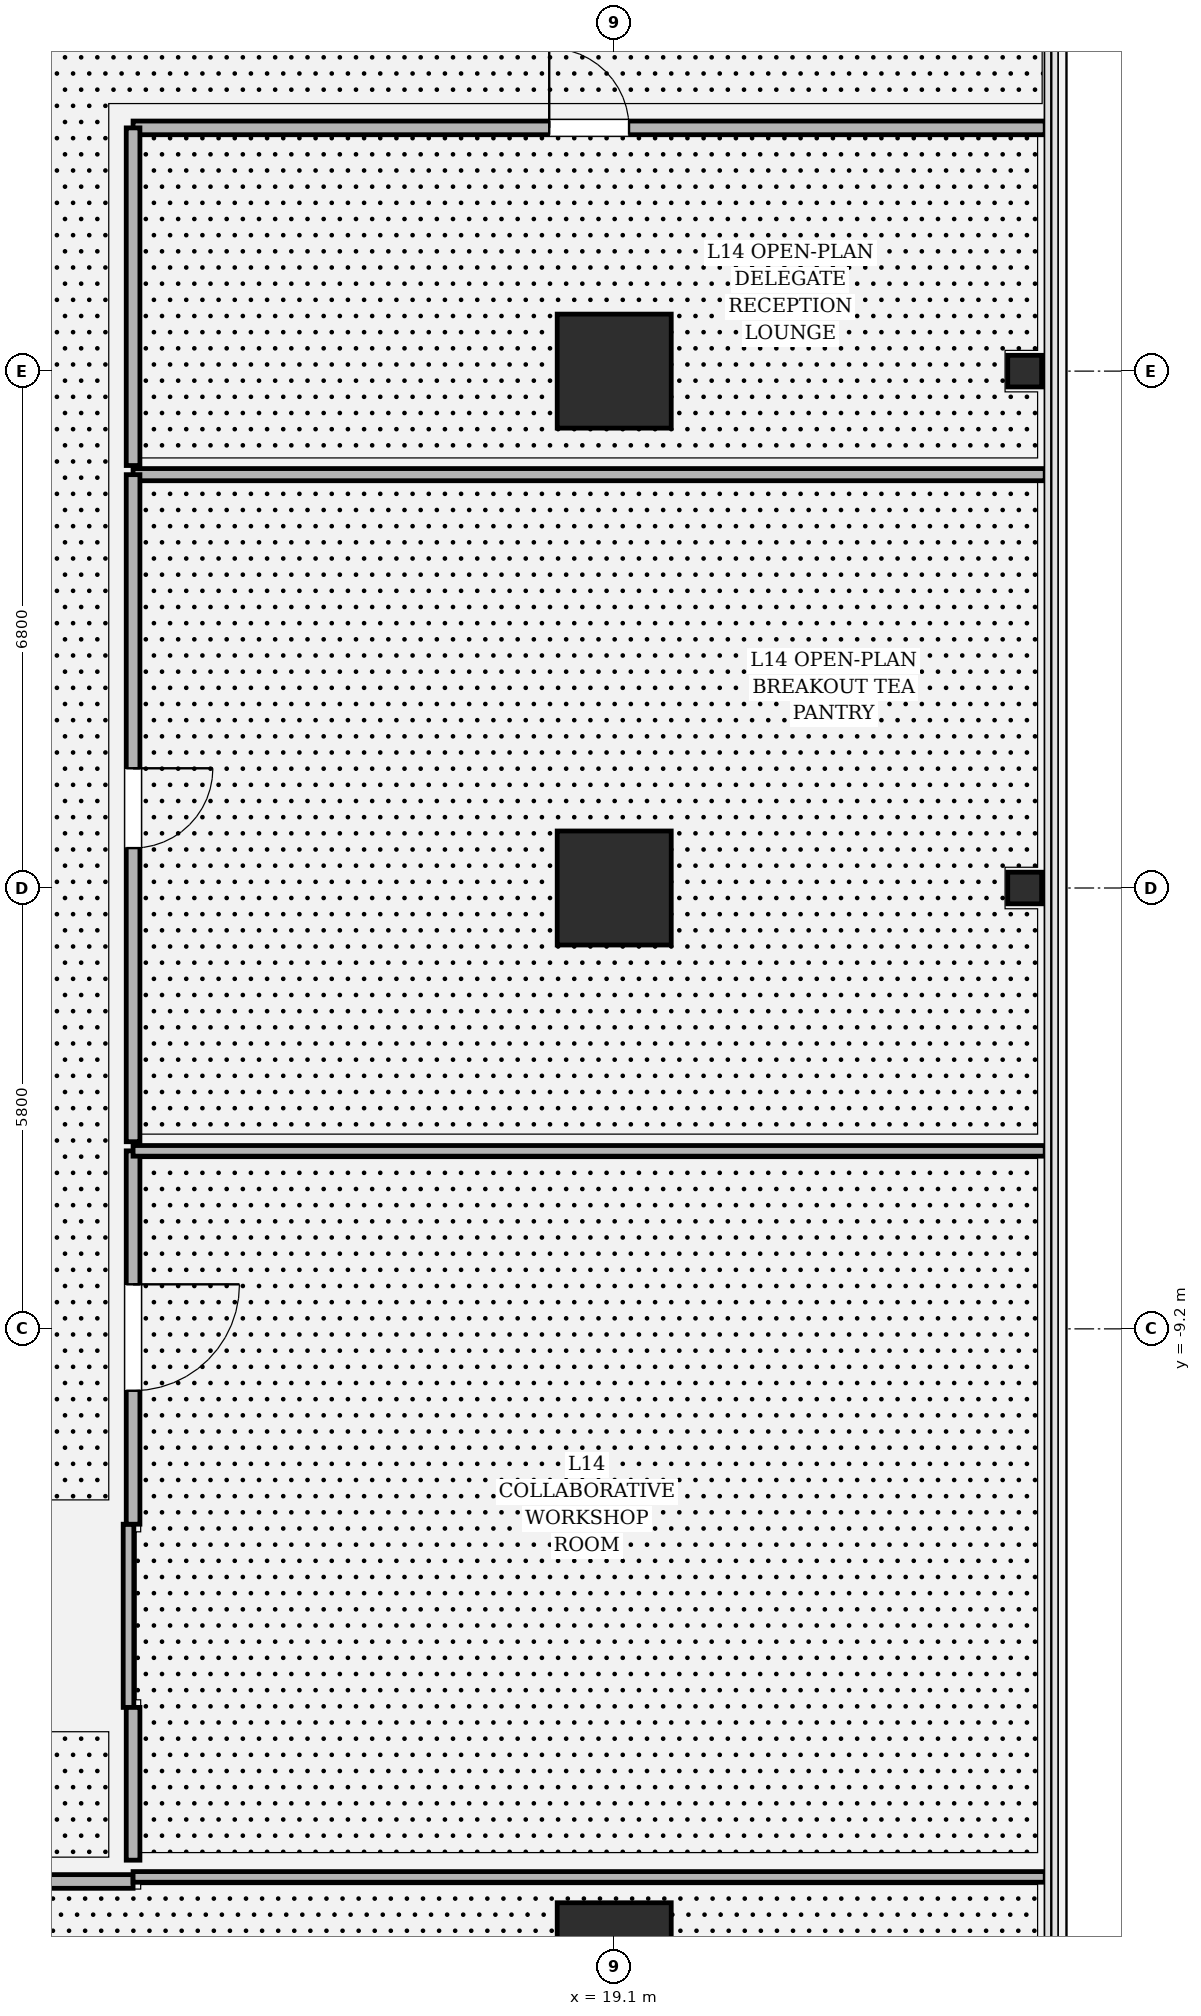
"""IFC4 building model, lengths in metres.
Left out: names, types, materials, properties, quantities, classifications, styles, units other than length and angle.
Written with IfcOpenShell. Run it as: python <this file> out.ifc"""

import sys

from ifc_helpers import new_model, si_unit, direction, frame, frame_2d, origin, origin_2d, place, context, subcontext, project, spatial, rectangle, hollow_rectangle, i_section, extrude, element, fill, save


model = new_model("IFC4")
c1 = context("Model", 3, precision=1e-05, world=origin(), true_north=direction((0.0, 1.0)))
c2 = subcontext(c1, "Body", "Model", "MODEL_VIEW")
j1 = project(units=[si_unit("LENGTHUNIT", "METRE"), si_unit("PLANEANGLEUNIT", "RADIAN")], contexts=[c1])
p1 = place(None, origin())
s1 = spatial("IfcSite", under=j1, at=p1, CompositionType="ELEMENT")
p2 = place(p1, origin())
s2 = spatial("IfcBuilding", under=s1, at=p2, CompositionType="ELEMENT")
p3 = place(p2, frame((0.0, 0.0, 64.65)))
s3 = spatial("IfcBuildingStorey", under=s2, at=p3, CompositionType="ELEMENT", Elevation=64.65)
for number, where, z_axis, x_axis in (
    (1, (19.1, -17.5, 0.0), (0.0, 0.0, 1.0), (1.0, 0.0, 0.0)),
    (2, (19.1, -3.4, 0.0), (0.0, 0.0, 1.0), (1.0, 0.0, 0.0)),
    (3, (19.1, 3.4, 0.0), (0.0, 0.0, 1.0), (1.0, 0.0, 0.0)),
):
    element("IfcColumn", number, at=place(p3, frame(where, z_axis=z_axis, x_axis=x_axis)), inside=s3, PredefinedType="COLUMN", context=c2, shape_type="SweptSolid", body=[
        extrude(hollow_rectangle(XDim=1.5, YDim=1.5, WallThickness=0.045, at=origin_2d()), origin(), (0.0, 0.0, 1.0), 4.05),
    ])
for number, where, z_axis, x_axis in (
    (4, (24.5, -3.4, 0.0), (0.0, 0.0, 1.0), (0.0, 1.0, 0.0)),
    (5, (24.5, 3.4, 0.0), (0.0, 0.0, 1.0), (0.0, 1.0, 0.0)),
):
    element("IfcColumn", number, at=place(p3, frame(where, z_axis=z_axis, x_axis=x_axis)), inside=s3, PredefinedType="COLUMN", context=c2, shape_type="SweptSolid", body=[
        extrude(i_section(OverallWidth=0.416, OverallDepth=0.446, WebThickness=0.039, FlangeThickness=0.062, FilletRadius=0.018, at=origin_2d()), origin(), (0.0, 0.0, 1.0), 4.048),
    ])
p4 = place(p3, frame((-4.022, -16.47, 0.0), z_axis=(0.0, 0.0, 1.0), x_axis=(1.0, 0.0, 0.0)))
e6 = element("IfcWall", 6, at=p4, inside=s3, PredefinedType="PARTITIONING", context=c2, shape_type="SweptSolid", body=[
    extrude(rectangle(XDim=16.792, YDim=0.18, at=frame_2d((8.396, 0.0))), origin(), (0.0, 0.0, 1.0), 3.104),
])
p5 = place(p4, frame((9.046, 0.0, 0.0)))
e7 = element("IfcOpeningElement", 7, at=p5, cuts=e6, PredefinedType="OPENING", context=c2, shape_type="SweptSolid", body=[
    extrude(rectangle(XDim=1.4, YDim=2.25, at=frame_2d((0.7, 1.125))), frame((0.0, 0.1, 0.0), z_axis=(0.0, -1.0, 0.0), x_axis=(1.0, 0.0, 0.0)), (0.0, 0.0, 1.0), 0.2),
])
p6 = place(p3, frame((12.77, -16.41, 0.0), z_axis=(0.0, 0.0, 1.0), x_axis=(1.0, 0.0, 0.0)))
e8 = element("IfcWall", 8, at=p6, inside=s3, PredefinedType="PARTITIONING", context=c2, shape_type="SweptSolid", body=[
    extrude(rectangle(XDim=12.0, YDim=0.14, at=frame_2d((6.0, 0.0))), origin(), (0.0, 0.0, 1.0), 2.524),
])
p7 = place(p3, frame((12.71, -14.18, 0.0), z_axis=(0.0, 0.0, 1.0), x_axis=(0.0, 1.0, 0.0)))
e9 = element("IfcWall", 9, at=p7, inside=s3, PredefinedType="PARTITIONING", context=c2, shape_type="SweptSolid", body=[
    extrude(rectangle(XDim=2.41, YDim=0.14, at=frame_2d((1.205, 0.0))), origin(), (0.0, 0.0, 1.0), 3.354),
])
p8 = place(p3, frame((12.77, -11.77, 0.0), z_axis=(0.0, 0.0, 1.0), x_axis=(0.0, 1.0, 0.0)))
e10 = element("IfcWall", 10, at=p8, inside=s3, PredefinedType="PARTITIONING", context=c2, shape_type="SweptSolid", body=[
    extrude(rectangle(XDim=4.912, YDim=0.18, at=frame_2d((2.456, 0.0))), origin(), (0.0, 0.0, 1.0), 3.104),
])
p9 = place(p8, frame((1.756, 0.0, 0.0)))
e11 = element("IfcOpeningElement", 11, at=p9, cuts=e10, PredefinedType="OPENING", context=c2, shape_type="SweptSolid", body=[
    extrude(rectangle(XDim=1.4, YDim=2.25, at=frame_2d((0.7, 1.125))), frame((0.0, 0.1, 0.0), z_axis=(0.0, -1.0, 0.0), x_axis=(1.0, 0.0, 0.0)), (0.0, 0.0, 1.0), 0.2),
])
p10 = place(p3, frame((12.77, -6.858, 0.0), z_axis=(0.0, 0.0, 1.0), x_axis=(1.0, 0.0, 0.0)))
e12 = element("IfcWall", 12, at=p10, inside=s3, PredefinedType="PARTITIONING", context=c2, shape_type="SweptSolid", body=[
    extrude(rectangle(XDim=12.0, YDim=0.14, at=frame_2d((6.0, 0.0))), origin(), (0.0, 0.0, 1.0), 2.524),
])
p11 = place(p3, frame((12.77, -16.19, 0.0), z_axis=(0.0, 0.0, 1.0), x_axis=(0.0, 1.0, 0.0)))
e13 = element("IfcWall", 13, at=p11, inside=s3, PredefinedType="PARTITIONING", context=c2, shape_type="SweptSolid", body=[
    extrude(rectangle(XDim=2.01, YDim=0.18, at=frame_2d((1.005, 0.0))), origin(), (0.0, 0.0, 1.0), 3.81),
])
p12 = place(p3, frame((12.77, 2.038, 0.0), z_axis=(0.0, 0.0, 1.0), x_axis=(1.0, 0.0, 0.0)))
e14 = element("IfcWall", 14, at=p12, inside=s3, PredefinedType="PARTITIONING", context=c2, shape_type="SweptSolid", body=[
    extrude(rectangle(XDim=12.0, YDim=0.16, at=frame_2d((6.0, 0.0))), origin(), (0.0, 0.0, 1.0), 2.524),
])
p13 = place(p3, frame((12.77, -6.738, 0.0), z_axis=(0.0, 0.0, 1.0), x_axis=(0.0, 1.0, 0.0)))
e15 = element("IfcWall", 15, at=p13, inside=s3, PredefinedType="PARTITIONING", context=c2, shape_type="SweptSolid", body=[
    extrude(rectangle(XDim=8.776, YDim=0.18, at=frame_2d((4.388, 0.0))), origin(), (0.0, 0.0, 1.0), 3.104),
])
p14 = place(p13, frame((3.863, 0.0, 0.0)))
e16 = element("IfcOpeningElement", 16, at=p14, cuts=e15, PredefinedType="OPENING", context=c2, shape_type="SweptSolid", body=[
    extrude(rectangle(XDim=1.05, YDim=2.2, at=frame_2d((0.525, 1.1))), frame((0.0, 0.1, 0.0), z_axis=(0.0, -1.0, 0.0), x_axis=(1.0, 0.0, 0.0)), (0.0, 0.0, 1.0), 0.2),
])
p15 = place(p3, frame((12.77, 6.6, 0.0), z_axis=(0.0, 0.0, 1.0), x_axis=(1.0, 0.0, 0.0)))
e17 = element("IfcWall", 17, at=p15, inside=s3, PredefinedType="PARTITIONING", context=c2, shape_type="SweptSolid", body=[
    extrude(rectangle(XDim=12.0, YDim=0.18, at=frame_2d((6.0, 0.0))), origin(), (0.0, 0.0, 1.0), 2.524),
])
p16 = place(p15, frame((5.475, 0.0, 0.0)))
e18 = element("IfcOpeningElement", 18, at=p16, cuts=e17, PredefinedType="OPENING", context=c2, shape_type="SweptSolid", body=[
    extrude(rectangle(XDim=1.05, YDim=2.2, at=frame_2d((0.525, 1.1))), frame((0.0, 0.1, 0.0), z_axis=(0.0, -1.0, 0.0), x_axis=(1.0, 0.0, 0.0)), (0.0, 0.0, 1.0), 0.2),
])
p17 = place(p3, frame((12.77, 2.158, 0.0), z_axis=(0.0, 0.0, 1.0), x_axis=(0.0, 1.0, 0.0)))
e19 = element("IfcWall", 19, at=p17, inside=s3, PredefinedType="PARTITIONING", context=c2, shape_type="SweptSolid", body=[
    extrude(rectangle(XDim=4.442, YDim=0.18, at=frame_2d((2.221, 0.0))), origin(), (0.0, 0.0, 1.0), 3.104),
])
p18 = place(p9, origin())
e20 = element("IfcDoor", 20, at=p18, inside=s3, OperationType="SINGLE_SWING_RIGHT", PredefinedType="DOOR", context=c2, shape_type="SweptSolid", body=[
    extrude(rectangle(XDim=1.4, YDim=2.25, at=frame_2d((0.7, 1.125))), frame((0.0, 0.025, 0.0), z_axis=(0.0, -1.0, 0.0), x_axis=(1.0, 0.0, 0.0)), (0.0, 0.0, 1.0), 0.05),
])
fill(e11, e20)
p19 = place(p14, origin())
e21 = element("IfcDoor", 21, at=p19, inside=s3, OperationType="SINGLE_SWING_RIGHT", PredefinedType="DOOR", context=c2, shape_type="SweptSolid", body=[
    extrude(rectangle(XDim=1.05, YDim=2.2, at=frame_2d((0.525, 1.1))), frame((0.0, 0.025, 0.0), z_axis=(0.0, -1.0, 0.0), x_axis=(1.0, 0.0, 0.0)), (0.0, 0.0, 1.0), 0.05),
])
fill(e16, e21)
p20 = place(p16, origin())
e22 = element("IfcDoor", 22, at=p20, inside=s3, OperationType="SINGLE_SWING_LEFT", PredefinedType="DOOR", context=c2, shape_type="SweptSolid", body=[
    extrude(rectangle(XDim=1.05, YDim=2.2, at=frame_2d((0.525, 1.1))), frame((0.0, 0.025, 0.0), z_axis=(0.0, -1.0, 0.0), x_axis=(1.0, 0.0, 0.0)), (0.0, 0.0, 1.0), 0.05),
])
fill(e18, e22)
save(model, sys.argv[1])
